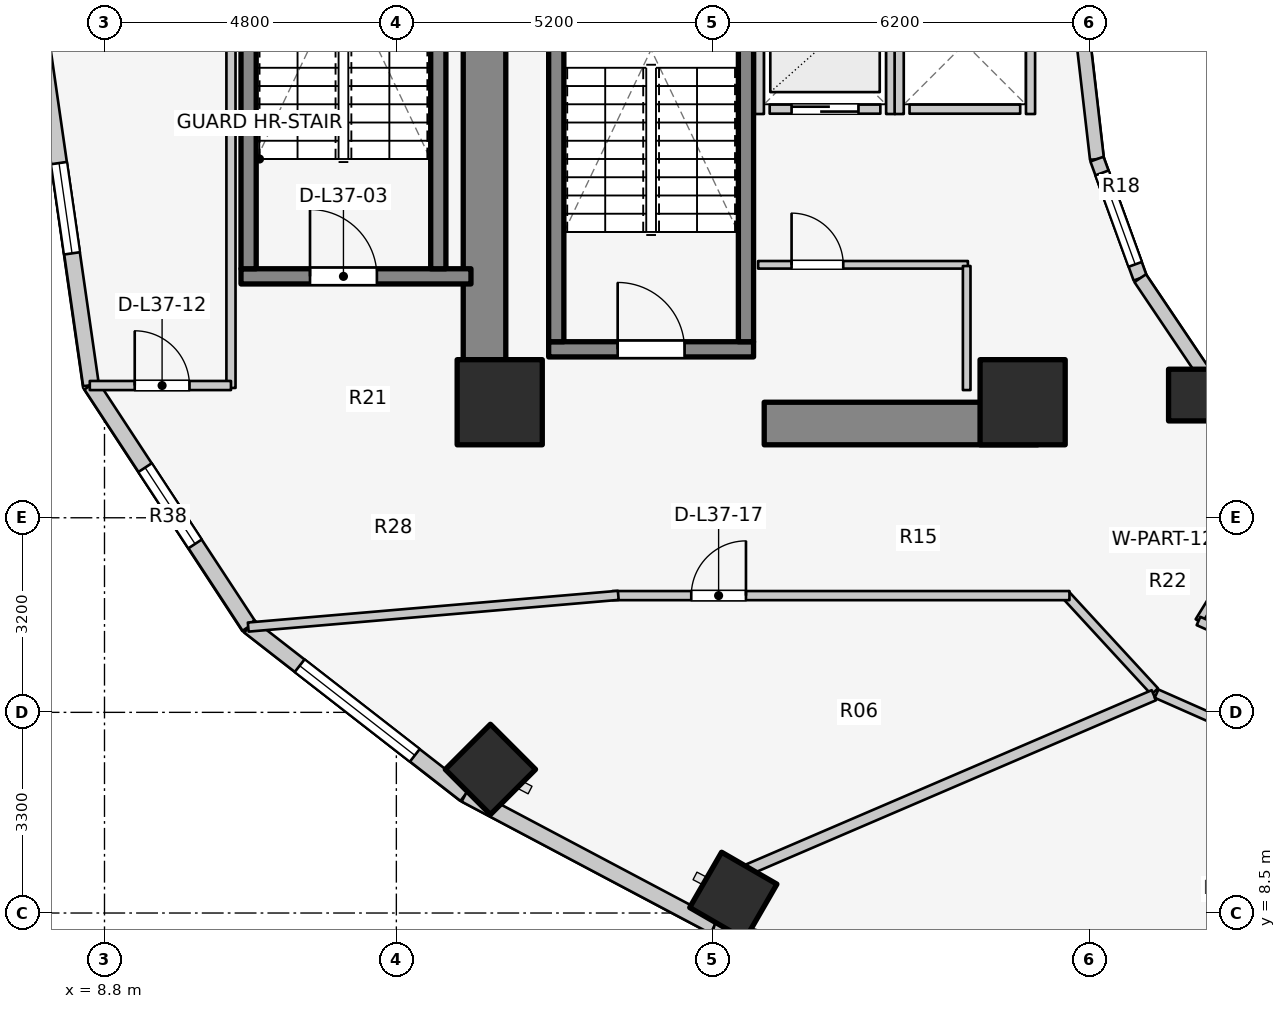
"""IFC4 building model, lengths in metres.
Left out: names, types, materials, properties, quantities, classifications, styles, units other than length and angle.
Written with IfcOpenShell. Run it as: python <this file> out.ifc"""

import sys

from ifc_helpers import new_model, si_unit, direction, frame, frame_2d, origin, origin_2d, place, context, subcontext, project, spatial, rectangle, extrude, element, fill, save


model = new_model("IFC4")
c1 = context("Model", 3, precision=1e-05, world=origin(), true_north=direction((0.0, 1.0)))
c2 = subcontext(c1, "Body", "Model", "MODEL_VIEW")
j1 = project(units=[si_unit("LENGTHUNIT", "METRE"), si_unit("PLANEANGLEUNIT", "RADIAN")], contexts=[c1])
p1 = place(None, origin())
s1 = spatial("IfcSite", under=j1, at=p1, CompositionType="ELEMENT")
p2 = place(p1, origin())
s2 = spatial("IfcBuilding", under=s1, at=p2, CompositionType="ELEMENT")
p3 = place(p2, frame((0.0, 0.0, 122.8)))
s3 = spatial("IfcBuildingStorey", under=s2, at=p3, CompositionType="ELEMENT", Elevation=122.8)
p4 = place(p3, frame((15.05, 17.05, 0.0), z_axis=(0.0, 0.0, 1.0), x_axis=(0.0, 1.0, 0.0)))
e1 = element("IfcWall", 1, at=p4, inside=s3, PredefinedType="SHEAR", context=c2, shape_type="SweptSolid", body=[
    extrude(rectangle(XDim=12.8, YDim=0.7, at=frame_2d((6.4, 0.0))), origin(), (0.0, 0.0, 1.0), 3.1),
])
p5 = place(p3, frame((19.65, 16.55, 0.0), z_axis=(0.0, 0.0, 1.0), x_axis=(1.0, 0.0, 0.0)))
e2 = element("IfcWall", 2, at=p5, inside=s3, PredefinedType="SHEAR", context=c2, shape_type="SweptSolid", body=[
    extrude(rectangle(XDim=4.5, YDim=0.7, at=frame_2d((2.25, 0.0))), origin(), (0.0, 0.0, 1.0), 3.1),
])
p6 = place(p3, frame((16.105, 17.77, 0.0), z_axis=(0.0, 0.0, 1.0), x_axis=(1.0, 0.0, 0.0)))
e3 = element("IfcWall", 3, at=p6, inside=s3, PredefinedType="SOLIDWALL", context=c2, shape_type="SweptSolid", body=[
    extrude(rectangle(XDim=3.37, YDim=0.25, at=frame_2d((1.685, 0.0))), origin(), (0.0, 0.0, 1.0), 3.1),
])
p7 = place(p6, frame((1.135, 0.0, 0.0)))
e4 = element("IfcOpeningElement", 4, at=p7, cuts=e3, PredefinedType="OPENING", context=c2, shape_type="SweptSolid", body=[
    extrude(rectangle(XDim=1.1, YDim=2.1, at=frame_2d((0.55, 1.05))), frame((0.0, 0.135, 0.0), z_axis=(0.0, -1.0, 0.0), x_axis=(1.0, 0.0, 0.0)), (0.0, 0.0, 1.0), 0.27),
])
for number, where, z_axis, x_axis in (
    (5, (16.23, 17.895, 0.0), (0.0, 0.0, 1.0), (0.0, 1.0, 0.0)),
    (6, (19.35, 17.895, 0.0), (0.0, 0.0, 1.0), (0.0, 1.0, 0.0)),
):
    element("IfcWall", number, at=place(p3, frame(where, z_axis=z_axis, x_axis=x_axis)), inside=s3, PredefinedType="SOLIDWALL", context=c2, shape_type="SweptSolid", body=[
        extrude(rectangle(XDim=7.81, YDim=0.25, at=frame_2d((3.905, 0.0))), origin(), (0.0, 0.0, 1.0), 3.1),
    ])
p8 = place(p3, frame((11.045, 18.97, 0.0), z_axis=(0.0, 0.0, 1.0), x_axis=(1.0, 0.0, 0.0)))
e7 = element("IfcWall", 7, at=p8, inside=s3, PredefinedType="SOLIDWALL", context=c2, shape_type="SweptSolid", body=[
    extrude(rectangle(XDim=3.782, YDim=0.25, at=frame_2d((1.891, 0.0))), origin(), (0.0, 0.0, 1.0), 3.1),
])
p9 = place(p8, frame((1.135, 0.0, 0.0)))
e8 = element("IfcOpeningElement", 8, at=p9, cuts=e7, PredefinedType="OPENING", context=c2, shape_type="SweptSolid", body=[
    extrude(rectangle(XDim=1.1, YDim=2.1, at=frame_2d((0.55, 1.05))), frame((0.0, 0.135, 0.0), z_axis=(0.0, -1.0, 0.0), x_axis=(1.0, 0.0, 0.0)), (0.0, 0.0, 1.0), 0.27),
])
for number, where, z_axis, x_axis in (
    (9, (11.17, 19.095, 0.0), (0.0, 0.0, 1.0), (0.0, 1.0, 0.0)),
    (10, (14.29, 19.095, 0.0), (0.0, 0.0, 1.0), (0.0, 1.0, 0.0)),
):
    element("IfcWall", number, at=place(p3, frame(where, z_axis=z_axis, x_axis=x_axis)), inside=s3, PredefinedType="SOLIDWALL", context=c2, shape_type="SweptSolid", body=[
        extrude(rectangle(XDim=7.81, YDim=0.25, at=frame_2d((3.905, 0.0))), origin(), (0.0, 0.0, 1.0), 3.1),
    ])
for number, where, z_axis, x_axis in (
    (11, (15.3, 16.9, 0.0), (0.0, 0.0, 1.0), (1.0, 0.0, 0.0)),
    (12, (23.9, 16.9, 0.0), (0.0, 0.0, 1.0), (1.0, 0.0, 0.0)),
):
    element("IfcColumn", number, at=place(p3, frame(where, z_axis=z_axis, x_axis=x_axis)), inside=s3, PredefinedType="COLUMN", context=c2, shape_type="SweptSolid", body=[
        extrude(rectangle(XDim=1.4, YDim=1.4, at=origin_2d()), origin(), (0.0, 0.0, 1.0), 3.1),
    ])
p10 = place(p3, frame((26.725, 17.018, 0.0), z_axis=(0.0, 0.0, 1.0), x_axis=(1.0, 0.0, 0.0)))
e13 = element("IfcColumn", 13, at=p10, inside=s3, PredefinedType="COLUMN", context=c2, shape_type="SweptSolid", body=[
    extrude(rectangle(XDim=0.85, YDim=0.85, at=origin_2d()), origin(), (0.0, 0.0, 1.0), 3.1),
])
for number, where, z_axis, x_axis in (
    (14, (15.147, 10.862, 0.0), (0.0, 0.0, 1.0), (-0.707, -0.707, 0.0)),
    (15, (19.142, 8.782, 0.0), (0.0, 0.0, 1.0), (-0.5, -0.866, 0.0)),
):
    element("IfcColumn", number, at=place(p3, frame(where, z_axis=z_axis, x_axis=x_axis)), inside=s3, PredefinedType="COLUMN", context=c2, shape_type="SweptSolid", body=[
        extrude(rectangle(XDim=1.05, YDim=1.05, at=origin_2d()), origin(), (0.0, 0.0, 1.0), 3.1),
    ])
p11 = place(p3, frame((24.88, 23.0, 0.0), z_axis=(0.0, 0.0, 1.0), x_axis=(0.114711713601, -0.993398823617, 0.0)))
e16 = element("IfcWall", 16, at=p11, inside=s3, PredefinedType="STANDARD", context=c2, shape_type="SweptSolid", body=[
    extrude(rectangle(XDim=2.115, YDim=0.23, at=frame_2d((1.058, 0.0))), origin(), (0.0, 0.0, 1.0), 2.84),
])
p12 = place(p3, frame((25.123, 20.898, 0.0), z_axis=(0.0, 0.0, 1.0), x_axis=(0.341423187295, -0.93990968033, 0.0)))
e17 = element("IfcWall", 17, at=p12, inside=s3, PredefinedType="STANDARD", context=c2, shape_type="SweptSolid", body=[
    extrude(rectangle(XDim=2.084, YDim=0.23, at=frame_2d((1.042, 0.0))), origin(), (0.0, 0.0, 1.0), 2.84),
])
p13 = place(p12, frame((0.242, 0.0, 0.85)))
e18 = element("IfcOpeningElement", 18, at=p13, cuts=e17, PredefinedType="OPENING", context=c2, shape_type="SweptSolid", body=[
    extrude(rectangle(XDim=1.6, YDim=1.65, at=frame_2d((0.8, 0.825))), frame((0.0, 0.125, 0.0), z_axis=(0.0, -1.0, 0.0), x_axis=(1.0, 0.0, 0.0)), (0.0, 0.0, 1.0), 0.25),
])
p14 = place(p3, frame((25.834, 18.94, 0.0), z_axis=(0.0, 0.0, 1.0), x_axis=(0.558197800898, -0.829707909492, 0.0)))
e19 = element("IfcWall", 19, at=p14, inside=s3, PredefinedType="STANDARD", context=c2, shape_type="SweptSolid", body=[
    extrude(rectangle(XDim=2.027, YDim=0.23, at=frame_2d((1.013, 0.0))), origin(), (0.0, 0.0, 1.0), 2.16),
])
p15 = place(p3, frame((26.965, 17.258, 0.0), z_axis=(0.0, 0.0, 1.0), x_axis=(0.752576694707, -0.658504607869, 0.0)))
e20 = element("IfcWall", 20, at=p15, inside=s3, PredefinedType="STANDARD", context=c2, shape_type="SweptSolid", body=[
    extrude(rectangle(XDim=1.959, YDim=0.23, at=frame_2d((0.98, 0.0))), origin(), (0.0, 0.0, 1.0), 2.16),
])
p16 = place(p3, frame((7.74, 23.0, 0.0), z_axis=(0.0, 0.0, 1.0), x_axis=(0.142572472068, -0.98978436551, 0.0)))
e21 = element("IfcWall", 21, at=p16, inside=s3, PredefinedType="STANDARD", context=c2, shape_type="SweptSolid", body=[
    extrude(rectangle(XDim=5.879, YDim=0.26, at=frame_2d((2.939, 0.0))), origin(), (0.0, 0.0, 1.0), 2.85),
])
p17 = place(p16, frame((2.189, 0.0, 0.75)))
e22 = element("IfcOpeningElement", 22, at=p17, cuts=e21, PredefinedType="OPENING", context=c2, shape_type="SweptSolid", body=[
    extrude(rectangle(XDim=1.5, YDim=1.6, at=frame_2d((0.75, 0.8))), frame((0.0, 0.14, 0.0), z_axis=(0.0, -1.0, 0.0), x_axis=(1.0, 0.0, 0.0)), (0.0, 0.0, 1.0), 0.28),
])
p18 = place(p3, frame((8.578, 17.181, 0.0), z_axis=(0.0, 0.0, 1.0), x_axis=(0.548283220945, -0.836292717672, 0.0)))
e23 = element("IfcWall", 23, at=p18, inside=s3, PredefinedType="STANDARD", context=c2, shape_type="SweptSolid", body=[
    extrude(rectangle(XDim=4.744, YDim=0.26, at=frame_2d((2.372, 0.0))), origin(), (0.0, 0.0, 1.0), 2.85),
])
p19 = place(p18, frame((1.622, 0.0, 0.75)))
e24 = element("IfcOpeningElement", 24, at=p19, cuts=e23, PredefinedType="OPENING", context=c2, shape_type="SweptSolid", body=[
    extrude(rectangle(XDim=1.5, YDim=1.6, at=frame_2d((0.75, 0.8))), frame((0.0, 0.14, 0.0), z_axis=(0.0, -1.0, 0.0), x_axis=(1.0, 0.0, 0.0)), (0.0, 0.0, 1.0), 0.28),
])
p20 = place(p3, frame((11.179, 13.214, 0.0), z_axis=(0.0, 0.0, 1.0), x_axis=(0.789127449954, -0.614229491094, 0.0)))
e25 = element("IfcWall", 25, at=p20, inside=s3, PredefinedType="STANDARD", context=c2, shape_type="SweptSolid", body=[
    extrude(rectangle(XDim=4.505, YDim=0.26, at=frame_2d((2.252, 0.0))), origin(), (0.0, 0.0, 1.0), 2.85),
])
p21 = place(p20, frame((1.052, 0.0, 0.75)))
e26 = element("IfcOpeningElement", 26, at=p21, cuts=e25, PredefinedType="OPENING", context=c2, shape_type="SweptSolid", body=[
    extrude(rectangle(XDim=2.4, YDim=1.7, at=frame_2d((1.2, 0.85))), frame((0.0, 0.14, 0.0), z_axis=(0.0, -1.0, 0.0), x_axis=(1.0, 0.0, 0.0)), (0.0, 0.0, 1.0), 0.28),
])
p22 = place(p3, frame((14.734, 10.447, 0.0), z_axis=(0.0, 0.0, 1.0), x_axis=(0.883668636807, -0.4681129568, 0.0)))
e27 = element("IfcWall", 27, at=p22, inside=s3, PredefinedType="STANDARD", context=c2, shape_type="SweptSolid", body=[
    extrude(rectangle(XDim=4.631, YDim=0.26, at=frame_2d((2.316, 0.0))), origin(), (0.0, 0.0, 1.0), 2.85),
])
p23 = place(p3, frame((18.827, 8.279, 0.0), z_axis=(0.0, 0.0, 1.0), x_axis=(0.962938491413, -0.269721081407, 0.0)))
e28 = element("IfcWall", 28, at=p23, inside=s3, PredefinedType="STANDARD", context=c2, shape_type="SweptSolid", body=[
    extrude(rectangle(XDim=5.563, YDim=0.26, at=frame_2d((2.782, 0.0))), origin(), (0.0, 0.0, 1.0), 2.85),
])
p24 = place(p23, frame((2.031, 0.0, 0.75)))
e29 = element("IfcOpeningElement", 29, at=p24, cuts=e28, PredefinedType="OPENING", context=c2, shape_type="SweptSolid", body=[
    extrude(rectangle(XDim=1.5, YDim=1.6, at=frame_2d((0.75, 0.8))), frame((0.0, 0.14, 0.0), z_axis=(0.0, -1.0, 0.0), x_axis=(1.0, 0.0, 0.0)), (0.0, 0.0, 1.0), 0.28),
])
p25 = place(p3, frame((19.74, 21.72, 0.0), z_axis=(0.0, 0.0, 1.0), x_axis=(1.0, 0.0, 0.0)))
e30 = element("IfcWall", 30, at=p25, inside=s3, PredefinedType="SOLIDWALL", context=c2, shape_type="SweptSolid", body=[
    extrude(rectangle(XDim=1.82, YDim=0.15, at=frame_2d((0.91, 0.0))), origin(), (0.0, 0.0, 1.0), 2.855),
])
p26 = place(p25, frame((0.36, 0.0, 0.0)))
e31 = element("IfcOpeningElement", 31, at=p26, cuts=e30, PredefinedType="OPENING", context=c2, shape_type="SweptSolid", body=[
    extrude(rectangle(XDim=1.1, YDim=2.1, at=frame_2d((0.55, 1.05))), frame((0.0, 0.085, 0.0), z_axis=(0.0, -1.0, 0.0), x_axis=(1.0, 0.0, 0.0)), (0.0, 0.0, 1.0), 0.17),
])
for number, where, z_axis, x_axis in (
    (32, (19.57, 21.64, 0.0), (0.0, 0.0, 1.0), (0.0, 1.0, 0.0)),
    (33, (21.73, 21.64, 0.0), (0.0, 0.0, 1.0), (0.0, 1.0, 0.0)),
):
    element("IfcWall", number, at=place(p3, frame(where, z_axis=z_axis, x_axis=x_axis)), inside=s3, PredefinedType="SOLIDWALL", context=c2, shape_type="SweptSolid", body=[
        extrude(rectangle(XDim=2.32, YDim=0.15, at=frame_2d((1.16, 0.0))), origin(), (0.0, 0.0, 1.0), 2.855),
    ])
p27 = place(p3, frame((22.04, 21.72, 0.0), z_axis=(0.0, 0.0, 1.0), x_axis=(1.0, 0.0, 0.0)))
e34 = element("IfcWall", 34, at=p27, inside=s3, PredefinedType="SOLIDWALL", context=c2, shape_type="SweptSolid", body=[
    extrude(rectangle(XDim=1.82, YDim=0.15, at=frame_2d((0.91, 0.0))), origin(), (0.0, 0.0, 1.0), 2.12),
])
p28 = place(p3, frame((21.87, 21.64, 0.0), z_axis=(0.0, 0.0, 1.0), x_axis=(0.0, 1.0, 0.0)))
e35 = element("IfcWall", 35, at=p28, inside=s3, PredefinedType="SOLIDWALL", context=c2, shape_type="SweptSolid", body=[
    extrude(rectangle(XDim=2.32, YDim=0.15, at=frame_2d((1.16, 0.0))), origin(), (0.0, 0.0, 1.0), 2.855),
])
p29 = place(p3, frame((24.03, 21.64, 0.0), z_axis=(0.0, 0.0, 1.0), x_axis=(0.0, 1.0, 0.0)))
e36 = element("IfcWall", 36, at=p29, inside=s3, PredefinedType="SOLIDWALL", context=c2, shape_type="SweptSolid", body=[
    extrude(rectangle(XDim=2.32, YDim=0.15, at=frame_2d((1.16, 0.0))), origin(), (0.0, 0.0, 1.0), 2.12),
])
p30 = place(p3, frame((19.55, 19.16, 0.0), z_axis=(0.0, 0.0, 1.0), x_axis=(1.0, 0.0, 0.0)))
e37 = element("IfcWall", 37, at=p30, inside=s3, PredefinedType="PARTITIONING", context=c2, shape_type="SweptSolid", body=[
    extrude(rectangle(XDim=3.45, YDim=0.125, at=frame_2d((1.725, 0.0))), origin(), (0.0, 0.0, 1.0), 2.12),
])
p31 = place(p30, frame((0.55, 0.0, 0.0)))
e38 = element("IfcOpeningElement", 38, at=p31, cuts=e37, PredefinedType="OPENING", context=c2, shape_type="SweptSolid", body=[
    extrude(rectangle(XDim=0.85, YDim=2.05, at=frame_2d((0.425, 1.025))), frame((0.0, 0.073, 0.0), z_axis=(0.0, -1.0, 0.0), x_axis=(1.0, 0.0, 0.0)), (0.0, 0.0, 1.0), 0.145),
])
p32 = place(p3, frame((22.98, 17.1, 0.0), z_axis=(0.0, 0.0, 1.0), x_axis=(0.0, 1.0, 0.0)))
e39 = element("IfcWall", 39, at=p32, inside=s3, PredefinedType="PARTITIONING", context=c2, shape_type="SweptSolid", body=[
    extrude(rectangle(XDim=2.04, YDim=0.125, at=frame_2d((1.02, 0.0))), origin(), (0.0, 0.0, 1.0), 2.855),
])
p33 = place(p3, frame((10.88, 17.135, 0.0), z_axis=(0.0, 0.0, 1.0), x_axis=(0.0, 1.0, 0.0)))
e40 = element("IfcWall", 40, at=p33, inside=s3, PredefinedType="PARTITIONING", context=c2, shape_type="SweptSolid", body=[
    extrude(rectangle(XDim=11.73, YDim=0.15, at=frame_2d((5.865, 0.0))), origin(), (0.0, 0.0, 1.0), 2.12),
])
p34 = place(p3, frame((8.558, 17.175, 0.0), z_axis=(0.0, 0.0, 1.0), x_axis=(1.0, 0.0, 0.0)))
e41 = element("IfcWall", 41, at=p34, inside=s3, PredefinedType="PARTITIONING", context=c2, shape_type="SweptSolid", body=[
    extrude(rectangle(XDim=2.322, YDim=0.15, at=frame_2d((1.161, 0.0))), origin(), (0.0, 0.0, 1.0), 2.855),
])
p35 = place(p34, frame((0.739, 0.0, 0.0)))
e42 = element("IfcOpeningElement", 42, at=p35, cuts=e41, PredefinedType="OPENING", context=c2, shape_type="SweptSolid", body=[
    extrude(rectangle(XDim=0.9, YDim=2.1, at=frame_2d((0.45, 1.05))), frame((0.0, 0.085, 0.0), z_axis=(0.0, -1.0, 0.0), x_axis=(1.0, 0.0, 0.0)), (0.0, 0.0, 1.0), 0.17),
])
p36 = place(p3, frame((26.072, 12.144, 0.0), z_axis=(0.0, 0.0, 1.0), x_axis=(-0.677579737957, 0.735449317567, 0.0)))
e43 = element("IfcWall", 43, at=p36, inside=s3, PredefinedType="PARTITIONING", context=c2, shape_type="SweptSolid", body=[
    extrude(rectangle(XDim=2.173, YDim=0.15, at=frame_2d((1.086, 0.0))), origin(), (0.0, 0.0, 1.0), 2.272),
])
p37 = place(p3, frame((17.15, 13.72, 0.0), z_axis=(0.0, 0.0, 1.0), x_axis=(1.0, 0.0, 0.0)))
e44 = element("IfcWall", 44, at=p37, inside=s3, PredefinedType="PARTITIONING", context=c2, shape_type="SweptSolid", body=[
    extrude(rectangle(XDim=7.52, YDim=0.15, at=frame_2d((3.76, 0.0))), origin(), (0.0, 0.0, 1.0), 2.272),
])
p38 = place(p37, frame((1.3, 0.0, 0.0)))
e45 = element("IfcOpeningElement", 45, at=p38, cuts=e44, PredefinedType="OPENING", context=c2, shape_type="SweptSolid", body=[
    extrude(rectangle(XDim=0.9, YDim=2.1, at=frame_2d((0.45, 1.05))), frame((0.0, 0.085, 0.0), z_axis=(0.0, -1.0, 0.0), x_axis=(1.0, 0.0, 0.0)), (0.0, 0.0, 1.0), 0.17),
])
p39 = place(p3, frame((17.25, 13.724, 0.0), z_axis=(0.0, 0.0, 1.0), x_axis=(-0.996341886029, -0.085456691633, 0.0)))
e46 = element("IfcWall", 46, at=p39, inside=s3, PredefinedType="PARTITIONING", context=c2, shape_type="SweptSolid", body=[
    extrude(rectangle(XDim=6.108, YDim=0.15, at=frame_2d((3.054, 0.0))), origin(), (0.0, 0.0, 1.0), 2.142),
])
p40 = place(p3, frame((28.45, 15.985, 0.0), z_axis=(0.0, 0.0, 1.0), x_axis=(-0.523587550846, -0.851971875474, 0.0)))
e47 = element("IfcWall", 47, at=p40, inside=s3, PredefinedType="PARTITIONING", context=c2, shape_type="SweptSolid", body=[
    extrude(rectangle(XDim=3.153, YDim=0.125, at=frame_2d((1.577, 0.0))), origin(), (0.0, 0.0, 1.0), 2.272),
])
p41 = place(p3, frame((26.793, 13.303, 0.0), z_axis=(0.0, 0.0, 1.0), x_axis=(0.913145536541, -0.407633694749, 0.0)))
e48 = element("IfcWall", 48, at=p41, inside=s3, PredefinedType="PARTITIONING", context=c2, shape_type="SweptSolid", body=[
    extrude(rectangle(XDim=2.756, YDim=0.15, at=frame_2d((1.378, 0.0))), origin(), (0.0, 0.0, 1.0), 2.272),
])
p42 = place(p3, frame((26.059, 12.082, 0.0), z_axis=(0.0, 0.0, 1.0), x_axis=(-0.918836579087, -0.394638240584, 0.0)))
e49 = element("IfcWall", 49, at=p42, inside=s3, PredefinedType="PARTITIONING", context=c2, shape_type="SweptSolid", body=[
    extrude(rectangle(XDim=7.253, YDim=0.18, at=frame_2d((3.626, 0.0))), origin(), (0.0, 0.0, 1.0), 2.272),
])
p43 = place(p3, frame((26.102, 12.108, 0.0), z_axis=(0.0, 0.0, 1.0), x_axis=(0.914519212393, -0.40454247016, 0.0)))
e50 = element("IfcWall", 50, at=p43, inside=s3, PredefinedType="PARTITIONING", context=c2, shape_type="SweptSolid", body=[
    extrude(rectangle(XDim=3.124, YDim=0.15, at=frame_2d((1.562, 0.0))), origin(), (0.0, 0.0, 1.0), 2.272),
])
p44 = place(p13, origin())
e51 = element("IfcWindow", 51, at=p44, inside=s3, PartitioningType="SINGLE_PANEL", PredefinedType="WINDOW", context=c2, shape_type="SweptSolid", body=[
    extrude(rectangle(XDim=1.6, YDim=1.65, at=frame_2d((0.8, 0.825))), frame((0.0, 0.03, 0.0), z_axis=(0.0, -1.0, 0.0), x_axis=(1.0, 0.0, 0.0)), (0.0, 0.0, 1.0), 0.06),
])
fill(e18, e51)
p45 = place(p17, origin())
e52 = element("IfcWindow", 52, at=p45, inside=s3, PartitioningType="SINGLE_PANEL", PredefinedType="WINDOW", context=c2, shape_type="SweptSolid", body=[
    extrude(rectangle(XDim=1.5, YDim=1.6, at=frame_2d((0.75, 0.8))), frame((0.0, 0.03, 0.0), z_axis=(0.0, -1.0, 0.0), x_axis=(1.0, 0.0, 0.0)), (0.0, 0.0, 1.0), 0.06),
])
fill(e22, e52)
p46 = place(p19, origin())
e53 = element("IfcWindow", 53, at=p46, inside=s3, PartitioningType="SINGLE_PANEL", PredefinedType="WINDOW", context=c2, shape_type="SweptSolid", body=[
    extrude(rectangle(XDim=1.5, YDim=1.6, at=frame_2d((0.75, 0.8))), frame((0.0, 0.03, 0.0), z_axis=(0.0, -1.0, 0.0), x_axis=(1.0, 0.0, 0.0)), (0.0, 0.0, 1.0), 0.06),
])
fill(e24, e53)
p47 = place(p21, origin())
e54 = element("IfcWindow", 54, at=p47, inside=s3, PartitioningType="SINGLE_PANEL", PredefinedType="WINDOW", context=c2, shape_type="SweptSolid", body=[
    extrude(rectangle(XDim=2.4, YDim=1.7, at=frame_2d((1.2, 0.85))), frame((0.0, 0.03, 0.0), z_axis=(0.0, -1.0, 0.0), x_axis=(1.0, 0.0, 0.0)), (0.0, 0.0, 1.0), 0.06),
])
fill(e26, e54)
p48 = place(p7, origin())
e55 = element("IfcDoor", 55, at=p48, inside=s3, OperationType="SINGLE_SWING_LEFT", PredefinedType="DOOR", context=c2, shape_type="SweptSolid", body=[
    extrude(rectangle(XDim=1.1, YDim=2.1, at=frame_2d((0.55, 1.05))), frame((0.0, 0.025, 0.0), z_axis=(0.0, -1.0, 0.0), x_axis=(1.0, 0.0, 0.0)), (0.0, 0.0, 1.0), 0.05),
])
fill(e4, e55)
p49 = place(p9, origin())
e56 = element("IfcDoor", 56, at=p49, inside=s3, OperationType="SINGLE_SWING_LEFT", PredefinedType="DOOR", context=c2, shape_type="SweptSolid", body=[
    extrude(rectangle(XDim=1.1, YDim=2.1, at=frame_2d((0.55, 1.05))), frame((0.0, 0.025, 0.0), z_axis=(0.0, -1.0, 0.0), x_axis=(1.0, 0.0, 0.0)), (0.0, 0.0, 1.0), 0.05),
])
fill(e8, e56)
p50 = place(p26, origin())
e57 = element("IfcDoor", 57, at=p50, inside=s3, OperationType="DOUBLE_DOOR_SLIDING", PredefinedType="DOOR", context=c2, shape_type="SweptSolid", body=[
    extrude(rectangle(XDim=1.1, YDim=2.1, at=frame_2d((0.55, 1.05))), frame((0.0, 0.025, 0.0), z_axis=(0.0, -1.0, 0.0), x_axis=(1.0, 0.0, 0.0)), (0.0, 0.0, 1.0), 0.05),
])
fill(e31, e57)
p51 = place(p31, origin())
e58 = element("IfcDoor", 58, at=p51, inside=s3, OperationType="SINGLE_SWING_LEFT", PredefinedType="DOOR", context=c2, shape_type="SweptSolid", body=[
    extrude(rectangle(XDim=0.85, YDim=2.05, at=frame_2d((0.425, 1.025))), frame((0.0, 0.025, 0.0), z_axis=(0.0, -1.0, 0.0), x_axis=(1.0, 0.0, 0.0)), (0.0, 0.0, 1.0), 0.05),
])
fill(e38, e58)
p52 = place(p35, origin())
e59 = element("IfcDoor", 59, at=p52, inside=s3, OperationType="SINGLE_SWING_LEFT", PredefinedType="DOOR", context=c2, shape_type="SweptSolid", body=[
    extrude(rectangle(XDim=0.9, YDim=2.1, at=frame_2d((0.45, 1.05))), frame((0.0, 0.025, 0.0), z_axis=(0.0, -1.0, 0.0), x_axis=(1.0, 0.0, 0.0)), (0.0, 0.0, 1.0), 0.05),
])
fill(e42, e59)
p53 = place(p38, origin())
e60 = element("IfcDoor", 60, at=p53, inside=s3, OperationType="SINGLE_SWING_RIGHT", PredefinedType="DOOR", context=c2, shape_type="SweptSolid", body=[
    extrude(rectangle(XDim=0.9, YDim=2.1, at=frame_2d((0.45, 1.05))), frame((0.0, 0.025, 0.0), z_axis=(0.0, -1.0, 0.0), x_axis=(1.0, 0.0, 0.0)), (0.0, 0.0, 1.0), 0.05),
])
fill(e45, e60)
save(model, sys.argv[1])
